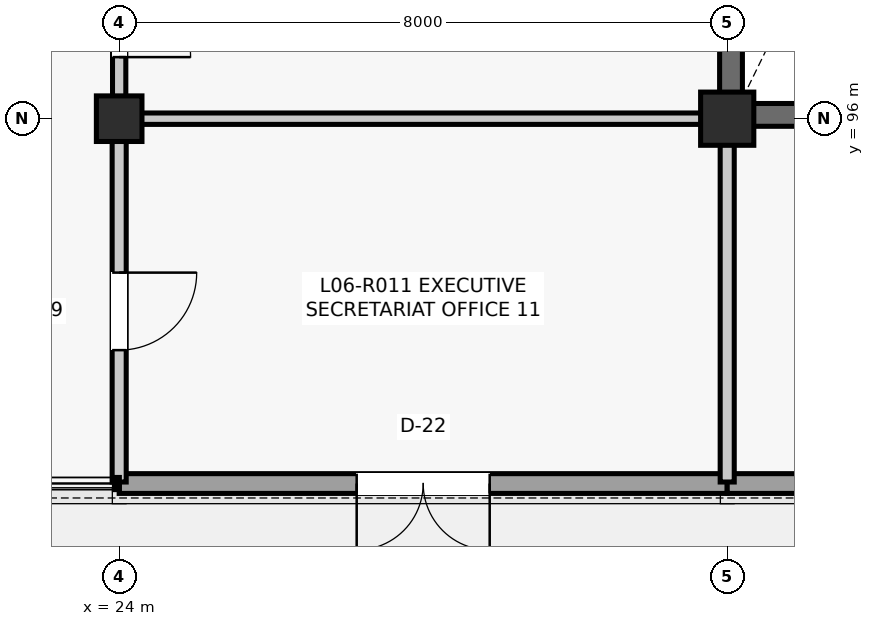
"""IFC4 building model, lengths in metres.
Left out: names, types, materials, properties, quantities, classifications, styles, units other than length and angle.
Written with IfcOpenShell. Run it as: python <this file> out.ifc"""

import sys

from ifc_helpers import new_model, si_unit, direction, frame, frame_2d, origin, origin_2d, place, context, subcontext, project, spatial, rectangle, extrude, element, fill, save


model = new_model("IFC4")
c1 = context("Model", 3, precision=1e-05, world=origin(), true_north=direction((0.0, 1.0)))
c2 = subcontext(c1, "Body", "Model", "MODEL_VIEW")
j1 = project(units=[si_unit("LENGTHUNIT", "METRE"), si_unit("PLANEANGLEUNIT", "RADIAN")], contexts=[c1])
p1 = place(None, origin())
s1 = spatial("IfcSite", under=j1, at=p1, CompositionType="ELEMENT")
p2 = place(p1, origin())
s2 = spatial("IfcBuilding", under=s1, at=p2, CompositionType="ELEMENT")
p3 = place(p2, frame((0.0, 0.0, 25.74)))
s3 = spatial("IfcBuildingStorey", under=s2, at=p3, CompositionType="ELEMENT", Elevation=25.74)
p4 = place(p3, frame((24.0, 96.0, 0.0), z_axis=(0.0, 0.0, 1.0), x_axis=(1.0, 0.0, 0.0)))
e1 = element("IfcColumn", 1, at=p4, inside=s3, PredefinedType="COLUMN", context=c2, shape_type="SweptSolid", body=[
    extrude(rectangle(XDim=0.6, YDim=0.6, at=origin_2d()), origin(), (0.0, 0.0, 1.0), 4.29),
])
p5 = place(p3, frame((32.0, 96.0, 0.0), z_axis=(0.0, 0.0, 1.0), x_axis=(1.0, 0.0, 0.0)))
e2 = element("IfcColumn", 2, at=p5, inside=s3, PredefinedType="COLUMN", context=c2, shape_type="SweptSolid", body=[
    extrude(rectangle(XDim=0.7, YDim=0.7, at=origin_2d()), origin(), (0.0, 0.0, 1.0), 4.29),
])
p6 = place(p3, frame((24.0, 91.2, 0.0), z_axis=(0.0, 0.0, 1.0), x_axis=(1.0, 0.0, 0.0)))
e3 = element("IfcWall", 3, at=p6, inside=s3, PredefinedType="SOLIDWALL", context=c2, shape_type="SweptSolid", body=[
    extrude(rectangle(XDim=8.0, YDim=0.26, at=frame_2d((4.0, 0.0))), origin(), (0.0, 0.0, 1.0), 4.09),
])
p7 = place(p6, frame((3.125, 0.0, 0.0)))
e4 = element("IfcOpeningElement", 4, at=p7, cuts=e3, PredefinedType="OPENING", context=c2, shape_type="SweptSolid", body=[
    extrude(rectangle(XDim=1.75, YDim=2.2, at=frame_2d((0.875, 1.1))), frame((0.0, 0.14, 0.0), z_axis=(0.0, -1.0, 0.0), x_axis=(1.0, 0.0, 0.0)), (0.0, 0.0, 1.0), 0.28),
])
p8 = place(p3, frame((32.0, 91.2, 0.0), z_axis=(0.0, 0.0, 1.0), x_axis=(1.0, 0.0, 0.0)))
e5 = element("IfcWall", 5, at=p8, inside=s3, PredefinedType="SOLIDWALL", context=c2, shape_type="SweptSolid", body=[
    extrude(rectangle(XDim=8.0, YDim=0.26, at=frame_2d((4.0, 0.0))), origin(), (0.0, 0.0, 1.0), 4.09),
])
p9 = place(p8, frame((2.75, 0.0, 0.85)))
e6 = element("IfcOpeningElement", 6, at=p9, cuts=e5, PredefinedType="OPENING", context=c2, shape_type="SweptSolid", body=[
    extrude(rectangle(XDim=2.5, YDim=2.2, at=frame_2d((1.25, 1.1))), frame((0.0, 0.14, 0.0), z_axis=(0.0, -1.0, 0.0), x_axis=(1.0, 0.0, 0.0)), (0.0, 0.0, 1.0), 0.28),
])
p10 = place(p3, frame((32.05, 96.24, 0.0), z_axis=(0.0, 0.0, 1.0), x_axis=(0.0, 1.0, 0.0)))
e7 = element("IfcWall", 7, at=p10, inside=s3, PredefinedType="SHEAR", context=c2, shape_type="SweptSolid", body=[
    extrude(rectangle(XDim=7.52, YDim=0.3, at=frame_2d((3.76, 0.0))), origin(), (0.0, 0.0, 1.0), 4.09),
])
p11 = place(p3, frame((32.24, 96.05, 0.0), z_axis=(0.0, 0.0, 1.0), x_axis=(1.0, 0.0, 0.0)))
e8 = element("IfcWall", 8, at=p11, inside=s3, PredefinedType="SHEAR", context=c2, shape_type="SweptSolid", body=[
    extrude(rectangle(XDim=3.91, YDim=0.3, at=frame_2d((1.955, 0.0))), origin(), (0.0, 0.0, 1.0), 4.09),
])
p12 = place(p3, frame((24.0, 91.22, 0.0), z_axis=(0.0, 0.0, 1.0), x_axis=(0.0, 1.0, 0.0)))
e9 = element("IfcWall", 9, at=p12, inside=s3, PredefinedType="PARTITIONING", context=c2, shape_type="SweptSolid", body=[
    extrude(rectangle(XDim=4.49, YDim=0.185, at=frame_2d((2.245, 0.0))), origin(), (0.0, 0.0, 1.0), 3.408),
])
p13 = place(p12, frame((1.735, 0.0, 0.0)))
e10 = element("IfcOpeningElement", 10, at=p13, cuts=e9, PredefinedType="OPENING", context=c2, shape_type="SweptSolid", body=[
    extrude(rectangle(XDim=1.02, YDim=2.2, at=frame_2d((0.51, 1.1))), frame((0.0, 0.103, 0.0), z_axis=(0.0, -1.0, 0.0), x_axis=(1.0, 0.0, 0.0)), (0.0, 0.0, 1.0), 0.205),
])
p14 = place(p3, frame((24.0, 96.29, 0.0), z_axis=(0.0, 0.0, 1.0), x_axis=(0.0, 1.0, 0.0)))
e11 = element("IfcWall", 11, at=p14, inside=s3, PredefinedType="PARTITIONING", context=c2, shape_type="SweptSolid", body=[
    extrude(rectangle(XDim=7.42, YDim=0.175, at=frame_2d((3.71, 0.0))), origin(), (0.0, 0.0, 1.0), 3.408),
])
p15 = place(p14, frame((0.52, 0.0, 0.0)))
e12 = element("IfcOpeningElement", 12, at=p15, cuts=e11, PredefinedType="OPENING", context=c2, shape_type="SweptSolid", body=[
    extrude(rectangle(XDim=0.94, YDim=2.12, at=frame_2d((0.47, 1.06))), frame((0.0, 0.097, 0.0), z_axis=(0.0, -1.0, 0.0), x_axis=(1.0, 0.0, 0.0)), (0.0, 0.0, 1.0), 0.195),
])
p16 = place(p3, frame((32.0, 91.22, 0.0), z_axis=(0.0, 0.0, 1.0), x_axis=(0.0, 1.0, 0.0)))
e13 = element("IfcWall", 13, at=p16, inside=s3, PredefinedType="PARTITIONING", context=c2, shape_type="SweptSolid", body=[
    extrude(rectangle(XDim=4.44, YDim=0.185, at=frame_2d((2.22, 0.0))), origin(), (0.0, 0.0, 1.0), 3.408),
])
p17 = place(p3, frame((24.29, 96.0, 0.0), z_axis=(0.0, 0.0, 1.0), x_axis=(1.0, 0.0, 0.0)))
e14 = element("IfcWall", 14, at=p17, inside=s3, PredefinedType="PARTITIONING", context=c2, shape_type="SweptSolid", body=[
    extrude(rectangle(XDim=7.37, YDim=0.15, at=frame_2d((3.685, 0.0))), origin(), (0.0, 0.0, 1.0), 3.408),
])
p18 = place(p7, frame((1.75, 0.0, 0.0), z_axis=(0.0, 0.0, 1.0), x_axis=(-1.0, 0.0, 0.0)))
e15 = element("IfcDoor", 15, at=p18, inside=s3, OperationType="DOUBLE_DOOR_SINGLE_SWING", PredefinedType="DOOR", context=c2, shape_type="SweptSolid", body=[
    extrude(rectangle(XDim=1.75, YDim=2.2, at=frame_2d((0.875, 1.1))), frame((0.0, 0.025, 0.0), z_axis=(0.0, -1.0, 0.0), x_axis=(1.0, 0.0, 0.0)), (0.0, 0.0, 1.0), 0.05),
])
fill(e4, e15)
p19 = place(p13, frame((1.02, 0.0, 0.0), z_axis=(0.0, 0.0, 1.0), x_axis=(-1.0, 0.0, 0.0)))
e16 = element("IfcDoor", 16, at=p19, inside=s3, OperationType="SINGLE_SWING_RIGHT", PredefinedType="DOOR", context=c2, shape_type="SweptSolid", body=[
    extrude(rectangle(XDim=1.02, YDim=2.2, at=frame_2d((0.51, 1.1))), frame((0.0, 0.025, 0.0), z_axis=(0.0, -1.0, 0.0), x_axis=(1.0, 0.0, 0.0)), (0.0, 0.0, 1.0), 0.05),
])
fill(e10, e16)
p20 = place(p15, frame((0.94, 0.0, 0.0), z_axis=(0.0, 0.0, 1.0), x_axis=(-1.0, 0.0, 0.0)))
e17 = element("IfcDoor", 17, at=p20, inside=s3, OperationType="SINGLE_SWING_LEFT", PredefinedType="DOOR", context=c2, shape_type="SweptSolid", body=[
    extrude(rectangle(XDim=0.94, YDim=2.12, at=frame_2d((0.47, 1.06))), frame((0.0, 0.025, 0.0), z_axis=(0.0, -1.0, 0.0), x_axis=(1.0, 0.0, 0.0)), (0.0, 0.0, 1.0), 0.05),
])
fill(e12, e17)
save(model, sys.argv[1])
